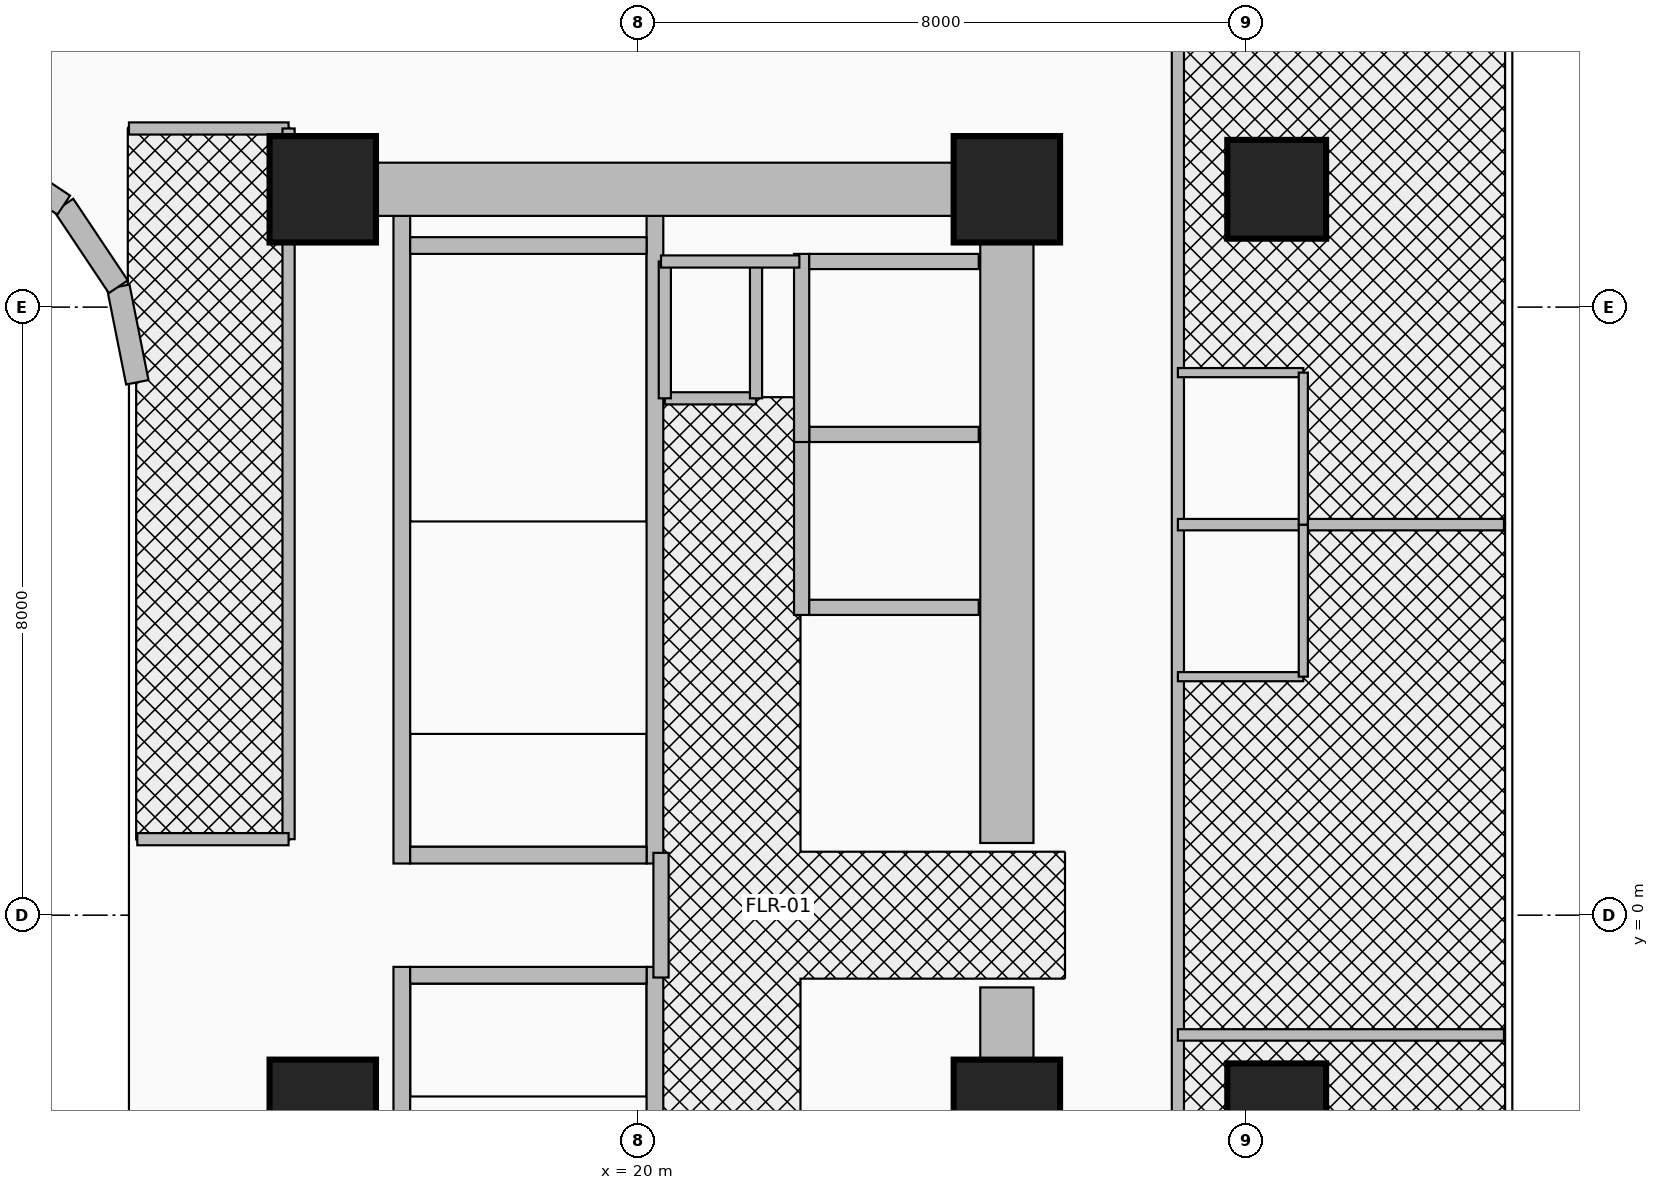
"""IFC4 building model, lengths in metres.
Left out: names, types, materials, properties, quantities, classifications, styles, units other than length and angle.
Written with IfcOpenShell. Run it as: python <this file> out.ifc"""

import sys

from ifc_helpers import new_model, si_unit, direction, frame, frame_2d, origin, origin_2d, place, context, subcontext, project, spatial, rectangle, circle, extrude, source, transform, mapped, element, fill, save


model = new_model("IFC4")
c1 = context("Model", 3, precision=1e-05, world=origin(), true_north=direction((0.0, 1.0)))
c2 = subcontext(c1, "Body", "Model", "MODEL_VIEW")
j1 = project(units=[si_unit("LENGTHUNIT", "METRE"), si_unit("PLANEANGLEUNIT", "RADIAN")], contexts=[c1])
p1 = place(None, origin())
s1 = spatial("IfcSite", under=j1, at=p1, CompositionType="ELEMENT")
p2 = place(p1, origin())
s2 = spatial("IfcBuilding", under=s1, at=p2, CompositionType="ELEMENT")
p3 = place(p2, frame((0.0, 0.0, 26.0)))
s3 = spatial("IfcBuildingStorey", under=s2, at=p3, CompositionType="ELEMENT", Elevation=26.0)
for number, where, z_axis, x_axis in (
    (1, (16.89, 0.68, 0.0), (0.0, 0.0, 1.0), (0.0, 1.0, 0.0)),
    (2, (20.22, 0.68, 0.0), (0.0, 0.0, 1.0), (0.0, 1.0, 0.0)),
):
    element("IfcWall", number, at=place(p3, frame(where, z_axis=z_axis, x_axis=x_axis)), inside=s3, PredefinedType="SHEAR", context=c2, shape_type="SweptSolid", body=[
        extrude(rectangle(XDim=8.52, YDim=0.22, at=frame_2d((4.26, 0.0))), origin(), (0.0, 0.0, 1.0), 3.46),
    ])
p4 = place(p3, frame((17.0, 0.79, 0.0), z_axis=(0.0, 0.0, 1.0), x_axis=(1.0, 0.0, 0.0)))
e3 = element("IfcWall", 3, at=p4, inside=s3, PredefinedType="SHEAR", context=c2, shape_type="SweptSolid", body=[
    extrude(rectangle(XDim=3.11, YDim=0.22, at=frame_2d((1.555, 0.0))), origin(), (0.0, 0.0, 1.0), 3.46),
])
p5 = place(p4, frame((0.95, 0.0, 0.0)))
e4 = element("IfcOpeningElement", 4, at=p5, cuts=e3, PredefinedType="OPENING", context=c2, shape_type="SweptSolid", body=[
    extrude(rectangle(XDim=1.1, YDim=2.15, at=frame_2d((0.55, 1.075))), frame((0.0, 0.125, 0.0), z_axis=(0.0, -1.0, 0.0), x_axis=(1.0, 0.0, 0.0)), (0.0, 0.0, 1.0), 0.25),
])
p6 = place(p3, frame((17.0, 8.81, 0.0), z_axis=(0.0, 0.0, 1.0), x_axis=(1.0, 0.0, 0.0)))
e5 = element("IfcWall", 5, at=p6, inside=s3, PredefinedType="SHEAR", context=c2, shape_type="SweptSolid", body=[
    extrude(rectangle(XDim=3.11, YDim=0.22, at=frame_2d((1.555, 0.0))), origin(), (0.0, 0.0, 1.0), 3.46),
])
for number, where, z_axis, x_axis in (
    (6, (16.89, -9.2, 0.0), (0.0, 0.0, 1.0), (0.0, 1.0, 0.0)),
    (7, (20.22, -9.2, 0.0), (0.0, 0.0, 1.0), (0.0, 1.0, 0.0)),
):
    element("IfcWall", number, at=place(p3, frame(where, z_axis=z_axis, x_axis=x_axis)), inside=s3, PredefinedType="SHEAR", context=c2, shape_type="SweptSolid", body=[
        extrude(rectangle(XDim=8.52, YDim=0.22, at=frame_2d((4.26, 0.0))), origin(), (0.0, 0.0, 1.0), 3.46),
    ])
p7 = place(p3, frame((17.0, -0.79, 0.0), z_axis=(0.0, 0.0, 1.0), x_axis=(1.0, 0.0, 0.0)))
e8 = element("IfcWall", 8, at=p7, inside=s3, PredefinedType="SHEAR", context=c2, shape_type="SweptSolid", body=[
    extrude(rectangle(XDim=3.11, YDim=0.22, at=frame_2d((1.555, 0.0))), origin(), (0.0, 0.0, 1.0), 3.46),
])
p8 = place(p7, frame((0.95, 0.0, 0.0)))
e9 = element("IfcOpeningElement", 9, at=p8, cuts=e8, PredefinedType="OPENING", context=c2, shape_type="SweptSolid", body=[
    extrude(rectangle(XDim=1.1, YDim=2.15, at=frame_2d((0.55, 1.075))), frame((0.0, 0.125, 0.0), z_axis=(0.0, -1.0, 0.0), x_axis=(1.0, 0.0, 0.0)), (0.0, 0.0, 1.0), 0.25),
])
for number, where, z_axis, x_axis in (
    (10, (24.85, -9.9, 0.0), (0.0, 0.0, 1.0), (0.0, 1.0, 0.0)),
    (11, (24.85, 0.95, 0.0), (0.0, 0.0, 1.0), (0.0, 1.0, 0.0)),
):
    element("IfcWall", number, at=place(p3, frame(where, z_axis=z_axis, x_axis=x_axis)), inside=s3, PredefinedType="SHEAR", context=c2, shape_type="SweptSolid", body=[
        extrude(rectangle(XDim=8.95, YDim=0.7, at=frame_2d((4.475, 0.0))), origin(), (0.0, 0.0, 1.0), 3.46),
    ])
p9 = place(p3, frame((15.85, 9.55, 0.0), z_axis=(0.0, 0.0, 1.0), x_axis=(1.0, 0.0, 0.0)))
e12 = element("IfcWall", 12, at=p9, inside=s3, PredefinedType="SHEAR", context=c2, shape_type="SweptSolid", body=[
    extrude(rectangle(XDim=9.0, YDim=0.7, at=frame_2d((4.5, 0.0))), origin(), (0.0, 0.0, 1.0), 3.46),
])
m1 = source(origin(), c2, "Body", "SweptSolid", [
    extrude(rectangle(XDim=1.4, YDim=1.4, at=origin_2d()), origin(), (0.0, 0.0, 1.0), 3.7),
])
for number, where, z_axis, x_axis in (
    (13, (15.85, -2.6, 0.0), (0.0, 0.0, 1.0), (1.0, 0.0, 0.0)),
    (14, (24.85, -2.6, 0.0), (0.0, 0.0, 1.0), (1.0, 0.0, 0.0)),
):
    element("IfcColumn", number, at=place(p3, frame(where, z_axis=z_axis, x_axis=x_axis)), inside=s3, PredefinedType="COLUMN", context=c2, shape_type="MappedRepresentation", body=[
        mapped(m1, transform((0.0, 0.0, 0.0), x_axis=(1.0, 0.0, 0.0), y_axis=(0.0, 1.0, 0.0), z_axis=(0.0, 0.0, 1.0), scale=1.0)),
    ])
m2 = source(origin(), c2, "Body", "SweptSolid", [
    extrude(circle(Radius=0.65, at=origin_2d()), origin(), (0.0, 0.0, 1.0), 3.7),
])
p10 = place(p3, frame((28.4, -2.6, 0.0), z_axis=(0.0, 0.0, 1.0), x_axis=(1.0, 0.0, 0.0)))
e15 = element("IfcColumn", 15, at=p10, inside=s3, PredefinedType="COLUMN", context=c2, shape_type="MappedRepresentation", body=[
    mapped(m2, transform((0.0, 0.0, 0.0), x_axis=(1.0, 0.0, 0.0), y_axis=(0.0, 1.0, 0.0), z_axis=(0.0, 0.0, 1.0), scale=1.0)),
])
for number, where, z_axis, x_axis in (
    (16, (15.85, 9.55, 0.0), (0.0, 0.0, 1.0), (1.0, 0.0, 0.0)),
    (17, (24.85, 9.55, 0.0), (0.0, 0.0, 1.0), (1.0, 0.0, 0.0)),
):
    element("IfcColumn", number, at=place(p3, frame(where, z_axis=z_axis, x_axis=x_axis)), inside=s3, PredefinedType="COLUMN", context=c2, shape_type="MappedRepresentation", body=[
        mapped(m1, transform((0.0, 0.0, 0.0), x_axis=(1.0, 0.0, 0.0), y_axis=(0.0, 1.0, 0.0), z_axis=(0.0, 0.0, 1.0), scale=1.0)),
    ])
p11 = place(p3, frame((28.4, 9.55, 0.0), z_axis=(0.0, 0.0, 1.0), x_axis=(1.0, 0.0, 0.0)))
e18 = element("IfcColumn", 18, at=p11, inside=s3, PredefinedType="COLUMN", context=c2, shape_type="MappedRepresentation", body=[
    mapped(m2, transform((0.0, 0.0, 0.0), x_axis=(1.0, 0.0, 0.0), y_axis=(0.0, 1.0, 0.0), z_axis=(0.0, 0.0, 1.0), scale=1.0)),
])
p12 = place(p3, frame((13.41, 7.011, 0.0), z_axis=(0.0, 0.0, 1.0), x_axis=(-0.195090163074, 0.980785312019, 0.0)))
e19 = element("IfcWall", 19, at=p12, inside=s3, PredefinedType="SOLIDWALL", context=c2, shape_type="SweptSolid", body=[
    extrude(rectangle(XDim=1.281, YDim=0.3, at=frame_2d((0.641, 0.0))), origin(), (0.0, 0.0, 1.0), 3.46),
])
for number, where, z_axis, x_axis in (
    (20, (13.16, 8.268, 0.0), (0.0, 0.0, 1.0), (-0.556, 0.831, 0.0)),
    (21, (12.442, 9.342, 0.0), (0.0, 0.0, 1.0), (-0.831, 0.556, 0.0)),
):
    element("IfcWall", number, at=place(p3, frame(where, z_axis=z_axis, x_axis=x_axis)), inside=s3, PredefinedType="SOLIDWALL", context=c2, shape_type="SweptSolid", body=[
        extrude(rectangle(XDim=1.292, YDim=0.3, at=frame_2d((0.646, 0.0))), origin(), (0.0, 0.0, 1.0), 3.46),
    ])
p13 = place(p3, frame((22.15, 3.95, 0.0), z_axis=(0.0, 0.0, 1.0), x_axis=(0.0, 1.0, 0.0)))
e22 = element("IfcWall", 22, at=p13, inside=s3, PredefinedType="MOVABLE", context=c2, shape_type="SweptSolid", body=[
    extrude(rectangle(XDim=2.475, YDim=0.2, at=frame_2d((1.238, 0.0))), origin(), (0.0, 0.0, 1.0), 3.46),
])
for number, where, z_axis, x_axis in (
    (23, (22.25, 4.05, 0.0), (0.0, 0.0, 1.0), (1.0, 0.0, 0.0)),
    (24, (22.25, 6.325, 0.0), (0.0, 0.0, 1.0), (1.0, 0.0, 0.0)),
):
    element("IfcWall", number, at=place(p3, frame(where, z_axis=z_axis, x_axis=x_axis)), inside=s3, PredefinedType="MOVABLE", context=c2, shape_type="SweptSolid", body=[
        extrude(rectangle(XDim=2.23, YDim=0.2, at=frame_2d((1.115, 0.0))), origin(), (0.0, 0.0, 1.0), 2.245),
    ])
p14 = place(p3, frame((22.15, 6.225, 0.0), z_axis=(0.0, 0.0, 1.0), x_axis=(0.0, 1.0, 0.0)))
e25 = element("IfcWall", 25, at=p14, inside=s3, PredefinedType="MOVABLE", context=c2, shape_type="SweptSolid", body=[
    extrude(rectangle(XDim=2.475, YDim=0.2, at=frame_2d((1.237, 0.0))), origin(), (0.0, 0.0, 1.0), 3.46),
])
p15 = place(p3, frame((22.25, 8.6, 0.0), z_axis=(0.0, 0.0, 1.0), x_axis=(1.0, 0.0, 0.0)))
e26 = element("IfcWall", 26, at=p15, inside=s3, PredefinedType="MOVABLE", context=c2, shape_type="SweptSolid", body=[
    extrude(rectangle(XDim=2.23, YDim=0.2, at=frame_2d((1.115, 0.0))), origin(), (0.0, 0.0, 1.0), 2.245),
])
p16 = place(p3, frame((20.3, -0.82, 0.0), z_axis=(0.0, 0.0, 1.0), x_axis=(0.0, 1.0, 0.0)))
e27 = element("IfcWall", 27, at=p16, inside=s3, PredefinedType="PARTITIONING", context=c2, shape_type="SweptSolid", body=[
    extrude(rectangle(XDim=1.64, YDim=0.2, at=frame_2d((0.82, 0.0))), origin(), (0.0, 0.0, 1.0), 3.46),
])
p17 = place(p16, frame((0.295, 0.0, 0.0)))
e28 = element("IfcOpeningElement", 28, at=p17, cuts=e27, PredefinedType="OPENING", context=c2, shape_type="SweptSolid", body=[
    extrude(rectangle(XDim=1.05, YDim=2.15, at=frame_2d((0.525, 1.075))), frame((0.0, 0.115, 0.0), z_axis=(0.0, -1.0, 0.0), x_axis=(1.0, 0.0, 0.0)), (0.0, 0.0, 1.0), 0.23),
])
p18 = place(p3, frame((20.35, 6.8, 0.0), z_axis=(0.0, 0.0, 1.0), x_axis=(1.0, 0.0, 0.0)))
e29 = element("IfcWall", 29, at=p18, inside=s3, PredefinedType="PARTITIONING", context=c2, shape_type="SweptSolid", body=[
    extrude(rectangle(XDim=1.2, YDim=0.16, at=frame_2d((0.6, 0.0))), origin(), (0.0, 0.0, 1.0), 3.46),
])
p19 = place(p18, frame((0.175, 0.0, 0.0)))
e30 = element("IfcOpeningElement", 30, at=p19, cuts=e29, PredefinedType="OPENING", context=c2, shape_type="SweptSolid", body=[
    extrude(rectangle(XDim=0.85, YDim=2.05, at=frame_2d((0.425, 1.025))), frame((0.0, 0.095, 0.0), z_axis=(0.0, -1.0, 0.0), x_axis=(1.0, 0.0, 0.0)), (0.0, 0.0, 1.0), 0.19),
])
for number, where, z_axis, x_axis in (
    (31, (21.55, 6.8, 0.0), (0.0, 0.0, 1.0), (0.0, 1.0, 0.0)),
    (32, (20.35, 6.8, 0.0), (0.0, 0.0, 1.0), (0.0, 1.0, 0.0)),
):
    element("IfcWall", number, at=place(p3, frame(where, z_axis=z_axis, x_axis=x_axis)), inside=s3, PredefinedType="PARTITIONING", context=c2, shape_type="SweptSolid", body=[
        extrude(rectangle(XDim=1.8, YDim=0.16, at=frame_2d((0.9, 0.0))), origin(), (0.0, 0.0, 1.0), 3.46),
    ])
p20 = place(p3, frame((20.3, 8.6, 0.0), z_axis=(0.0, 0.0, 1.0), x_axis=(1.0, 0.0, 0.0)))
e33 = element("IfcWall", 33, at=p20, inside=s3, PredefinedType="PARTITIONING", context=c2, shape_type="SweptSolid", body=[
    extrude(rectangle(XDim=1.82, YDim=0.16, at=frame_2d((0.91, 0.0))), origin(), (0.0, 0.0, 1.0), 3.46),
])
p21 = place(p3, frame((27.1, -13.89, 0.0), z_axis=(0.0, 0.0, 1.0), x_axis=(0.0, 1.0, 0.0)))
e34 = element("IfcWall", 34, at=p21, inside=s3, PredefinedType="PARTITIONING", context=c2, shape_type="SweptSolid", body=[
    extrude(rectangle(XDim=25.74, YDim=0.16, at=frame_2d((12.87, 0.0))), origin(), (0.0, 0.0, 1.0), 2.583),
])
p22 = place(p21, frame((2.62, 0.0, 0.0)))
e35 = element("IfcOpeningElement", 35, at=p22, cuts=e34, PredefinedType="OPENING", context=c2, shape_type="SweptSolid", body=[
    extrude(rectangle(XDim=0.95, YDim=2.15, at=frame_2d((0.475, 1.075))), frame((0.0, 0.095, 0.0), z_axis=(0.0, -1.0, 0.0), x_axis=(1.0, 0.0, 0.0)), (0.0, 0.0, 1.0), 0.19),
])
p23 = place(p21, frame((8.484, 0.0, 0.0)))
e36 = element("IfcOpeningElement", 36, at=p23, cuts=e34, PredefinedType="OPENING", context=c2, shape_type="SweptSolid", body=[
    extrude(rectangle(XDim=0.95, YDim=2.15, at=frame_2d((0.475, 1.075))), frame((0.0, 0.095, 0.0), z_axis=(0.0, -1.0, 0.0), x_axis=(1.0, 0.0, 0.0)), (0.0, 0.0, 1.0), 0.19),
])
p24 = place(p21, frame((14.197, 0.0, 0.0)))
e37 = element("IfcOpeningElement", 37, at=p24, cuts=e34, PredefinedType="OPENING", context=c2, shape_type="SweptSolid", body=[
    extrude(rectangle(XDim=0.95, YDim=2.15, at=frame_2d((0.475, 1.075))), frame((0.0, 0.095, 0.0), z_axis=(0.0, -1.0, 0.0), x_axis=(1.0, 0.0, 0.0)), (0.0, 0.0, 1.0), 0.19),
])
p25 = place(p21, frame((21.648, 0.0, 0.0)))
e38 = element("IfcOpeningElement", 38, at=p25, cuts=e34, PredefinedType="OPENING", context=c2, shape_type="SweptSolid", body=[
    extrude(rectangle(XDim=0.95, YDim=2.15, at=frame_2d((0.475, 1.075))), frame((0.0, 0.095, 0.0), z_axis=(0.0, -1.0, 0.0), x_axis=(1.0, 0.0, 0.0)), (0.0, 0.0, 1.0), 0.19),
])
for number, where, z_axis, x_axis in (
    (39, (27.1, -1.575, 0.0), (0.0, 0.0, 1.0), (1.0, 0.0, 0.0)),
    (40, (27.1, 5.138, 0.0), (0.0, 0.0, 1.0), (1.0, 0.0, 0.0)),
):
    element("IfcWall", number, at=place(p3, frame(where, z_axis=z_axis, x_axis=x_axis)), inside=s3, PredefinedType="PARTITIONING", context=c2, shape_type="SweptSolid", body=[
        extrude(rectangle(XDim=4.29, YDim=0.15, at=frame_2d((2.145, 0.0))), origin(), (0.0, 0.0, 1.0), 2.896),
    ])
p26 = place(p3, frame((27.1, 3.138, 0.0), z_axis=(0.0, 0.0, 1.0), x_axis=(1.0, 0.0, 0.0)))
e41 = element("IfcWall", 41, at=p26, inside=s3, PredefinedType="PARTITIONING", context=c2, shape_type="SweptSolid", body=[
    extrude(rectangle(XDim=1.65, YDim=0.12, at=frame_2d((0.825, 0.0))), origin(), (0.0, 0.0, 1.0), 2.896),
])
p27 = place(p3, frame((28.75, 3.138, 0.0), z_axis=(0.0, 0.0, 1.0), x_axis=(0.0, 1.0, 0.0)))
e42 = element("IfcWall", 42, at=p27, inside=s3, PredefinedType="PARTITIONING", context=c2, shape_type="SweptSolid", body=[
    extrude(rectangle(XDim=2.0, YDim=0.12, at=frame_2d((1.0, 0.0))), origin(), (0.0, 0.0, 1.0), 3.46),
])
p28 = place(p27, frame((0.575, 0.0, 0.0)))
e43 = element("IfcOpeningElement", 43, at=p28, cuts=e42, PredefinedType="OPENING", context=c2, shape_type="SweptSolid", body=[
    extrude(rectangle(XDim=0.85, YDim=2.1, at=frame_2d((0.425, 1.05))), frame((0.0, 0.075, 0.0), z_axis=(0.0, -1.0, 0.0), x_axis=(1.0, 0.0, 0.0)), (0.0, 0.0, 1.0), 0.15),
])
p29 = place(p3, frame((27.1, 7.138, 0.0), z_axis=(0.0, 0.0, 1.0), x_axis=(1.0, 0.0, 0.0)))
e44 = element("IfcWall", 44, at=p29, inside=s3, PredefinedType="PARTITIONING", context=c2, shape_type="SweptSolid", body=[
    extrude(rectangle(XDim=1.65, YDim=0.12, at=frame_2d((0.825, 0.0))), origin(), (0.0, 0.0, 1.0), 2.896),
])
p30 = place(p3, frame((28.75, 5.138, 0.0), z_axis=(0.0, 0.0, 1.0), x_axis=(0.0, 1.0, 0.0)))
e45 = element("IfcWall", 45, at=p30, inside=s3, PredefinedType="PARTITIONING", context=c2, shape_type="SweptSolid", body=[
    extrude(rectangle(XDim=2.0, YDim=0.12, at=frame_2d((1.0, 0.0))), origin(), (0.0, 0.0, 1.0), 3.46),
])
p31 = place(p30, frame((0.575, 0.0, 0.0)))
e46 = element("IfcOpeningElement", 46, at=p31, cuts=e45, PredefinedType="OPENING", context=c2, shape_type="SweptSolid", body=[
    extrude(rectangle(XDim=0.85, YDim=2.1, at=frame_2d((0.425, 1.05))), frame((0.0, 0.075, 0.0), z_axis=(0.0, -1.0, 0.0), x_axis=(1.0, 0.0, 0.0)), (0.0, 0.0, 1.0), 0.15),
])
p32 = place(p3, frame((13.3, 10.35, 0.0), z_axis=(0.0, 0.0, 1.0), x_axis=(1.0, 0.0, 0.0)))
e47 = element("IfcWall", 47, at=p32, inside=s3, PredefinedType="PARTITIONING", context=c2, shape_type="SweptSolid", body=[
    extrude(rectangle(XDim=2.1, YDim=0.16, at=frame_2d((1.05, 0.0))), origin(), (0.0, 0.0, 1.0), 2.583),
])
p33 = place(p32, frame((0.45, 0.0, 0.0)))
e48 = element("IfcOpeningElement", 48, at=p33, cuts=e47, PredefinedType="OPENING", context=c2, shape_type="SweptSolid", body=[
    extrude(rectangle(XDim=0.9, YDim=2.1, at=frame_2d((0.45, 1.05))), frame((0.0, 0.095, 0.0), z_axis=(0.0, -1.0, 0.0), x_axis=(1.0, 0.0, 0.0)), (0.0, 0.0, 1.0), 0.19),
])
p34 = place(p3, frame((15.4, 1.0, 0.0), z_axis=(0.0, 0.0, 1.0), x_axis=(0.0, 1.0, 0.0)))
e49 = element("IfcWall", 49, at=p34, inside=s3, PredefinedType="PARTITIONING", context=c2, shape_type="SweptSolid", body=[
    extrude(rectangle(XDim=9.35, YDim=0.16, at=frame_2d((4.675, 0.0))), origin(), (0.0, 0.0, 1.0), 2.245),
])
p35 = place(p3, frame((13.41, 1.0, 0.0), z_axis=(0.0, 0.0, 1.0), x_axis=(1.0, 0.0, 0.0)))
e50 = element("IfcWall", 50, at=p35, inside=s3, PredefinedType="PARTITIONING", context=c2, shape_type="SweptSolid", body=[
    extrude(rectangle(XDim=1.99, YDim=0.16, at=frame_2d((0.995, 0.0))), origin(), (0.0, 0.0, 1.0), 2.245),
])
p36 = place(p17, origin())
e51 = element("IfcDoor", 51, at=p36, inside=s3, OperationType="SINGLE_SWING_RIGHT", PredefinedType="DOOR", context=c2, shape_type="SweptSolid", body=[
    extrude(rectangle(XDim=1.05, YDim=2.15, at=frame_2d((0.525, 1.075))), frame((0.0, 0.025, 0.0), z_axis=(0.0, -1.0, 0.0), x_axis=(1.0, 0.0, 0.0)), (0.0, 0.0, 1.0), 0.05),
])
fill(e28, e51)
p37 = place(p5, frame((1.1, 0.0, 0.0), z_axis=(0.0, 0.0, 1.0), x_axis=(-1.0, 0.0, 0.0)))
e52 = element("IfcDoor", 52, at=p37, inside=s3, OperationType="SINGLE_SWING_LEFT", PredefinedType="DOOR", context=c2, shape_type="SweptSolid", body=[
    extrude(rectangle(XDim=1.1, YDim=2.15, at=frame_2d((0.55, 1.075))), frame((0.0, 0.025, 0.0), z_axis=(0.0, -1.0, 0.0), x_axis=(1.0, 0.0, 0.0)), (0.0, 0.0, 1.0), 0.05),
])
fill(e4, e52)
p38 = place(p8, origin())
e53 = element("IfcDoor", 53, at=p38, inside=s3, OperationType="SINGLE_SWING_RIGHT", PredefinedType="DOOR", context=c2, shape_type="SweptSolid", body=[
    extrude(rectangle(XDim=1.1, YDim=2.15, at=frame_2d((0.55, 1.075))), frame((0.0, 0.025, 0.0), z_axis=(0.0, -1.0, 0.0), x_axis=(1.0, 0.0, 0.0)), (0.0, 0.0, 1.0), 0.05),
])
fill(e9, e53)
p39 = place(p19, origin())
e54 = element("IfcDoor", 54, at=p39, inside=s3, OperationType="SINGLE_SWING_LEFT", PredefinedType="DOOR", context=c2, shape_type="SweptSolid", body=[
    extrude(rectangle(XDim=0.85, YDim=2.05, at=frame_2d((0.425, 1.025))), frame((0.0, 0.025, 0.0), z_axis=(0.0, -1.0, 0.0), x_axis=(1.0, 0.0, 0.0)), (0.0, 0.0, 1.0), 0.05),
])
fill(e30, e54)
p40 = place(p24, origin())
e55 = element("IfcDoor", 55, at=p40, inside=s3, OperationType="SINGLE_SWING_RIGHT", PredefinedType="DOOR", context=c2, shape_type="SweptSolid", body=[
    extrude(rectangle(XDim=0.95, YDim=2.15, at=frame_2d((0.475, 1.075))), frame((0.0, 0.025, 0.0), z_axis=(0.0, -1.0, 0.0), x_axis=(1.0, 0.0, 0.0)), (0.0, 0.0, 1.0), 0.05),
])
fill(e37, e55)
p41 = place(p28, origin())
e56 = element("IfcDoor", 56, at=p41, inside=s3, OperationType="SINGLE_SWING_LEFT", PredefinedType="DOOR", context=c2, shape_type="SweptSolid", body=[
    extrude(rectangle(XDim=0.85, YDim=2.1, at=frame_2d((0.425, 1.05))), frame((0.0, 0.025, 0.0), z_axis=(0.0, -1.0, 0.0), x_axis=(1.0, 0.0, 0.0)), (0.0, 0.0, 1.0), 0.05),
])
fill(e43, e56)
p42 = place(p25, origin())
e57 = element("IfcDoor", 57, at=p42, inside=s3, OperationType="SINGLE_SWING_RIGHT", PredefinedType="DOOR", context=c2, shape_type="SweptSolid", body=[
    extrude(rectangle(XDim=0.95, YDim=2.15, at=frame_2d((0.475, 1.075))), frame((0.0, 0.025, 0.0), z_axis=(0.0, -1.0, 0.0), x_axis=(1.0, 0.0, 0.0)), (0.0, 0.0, 1.0), 0.05),
])
fill(e38, e57)
p43 = place(p31, origin())
e58 = element("IfcDoor", 58, at=p43, inside=s3, OperationType="SINGLE_SWING_LEFT", PredefinedType="DOOR", context=c2, shape_type="SweptSolid", body=[
    extrude(rectangle(XDim=0.85, YDim=2.1, at=frame_2d((0.425, 1.05))), frame((0.0, 0.025, 0.0), z_axis=(0.0, -1.0, 0.0), x_axis=(1.0, 0.0, 0.0)), (0.0, 0.0, 1.0), 0.05),
])
fill(e46, e58)
p44 = place(p33, origin())
e59 = element("IfcDoor", 59, at=p44, inside=s3, OperationType="SINGLE_SWING_RIGHT", PredefinedType="DOOR", context=c2, shape_type="SweptSolid", body=[
    extrude(rectangle(XDim=0.9, YDim=2.1, at=frame_2d((0.45, 1.05))), frame((0.0, 0.025, 0.0), z_axis=(0.0, -1.0, 0.0), x_axis=(1.0, 0.0, 0.0)), (0.0, 0.0, 1.0), 0.05),
])
fill(e48, e59)
save(model, sys.argv[1])
